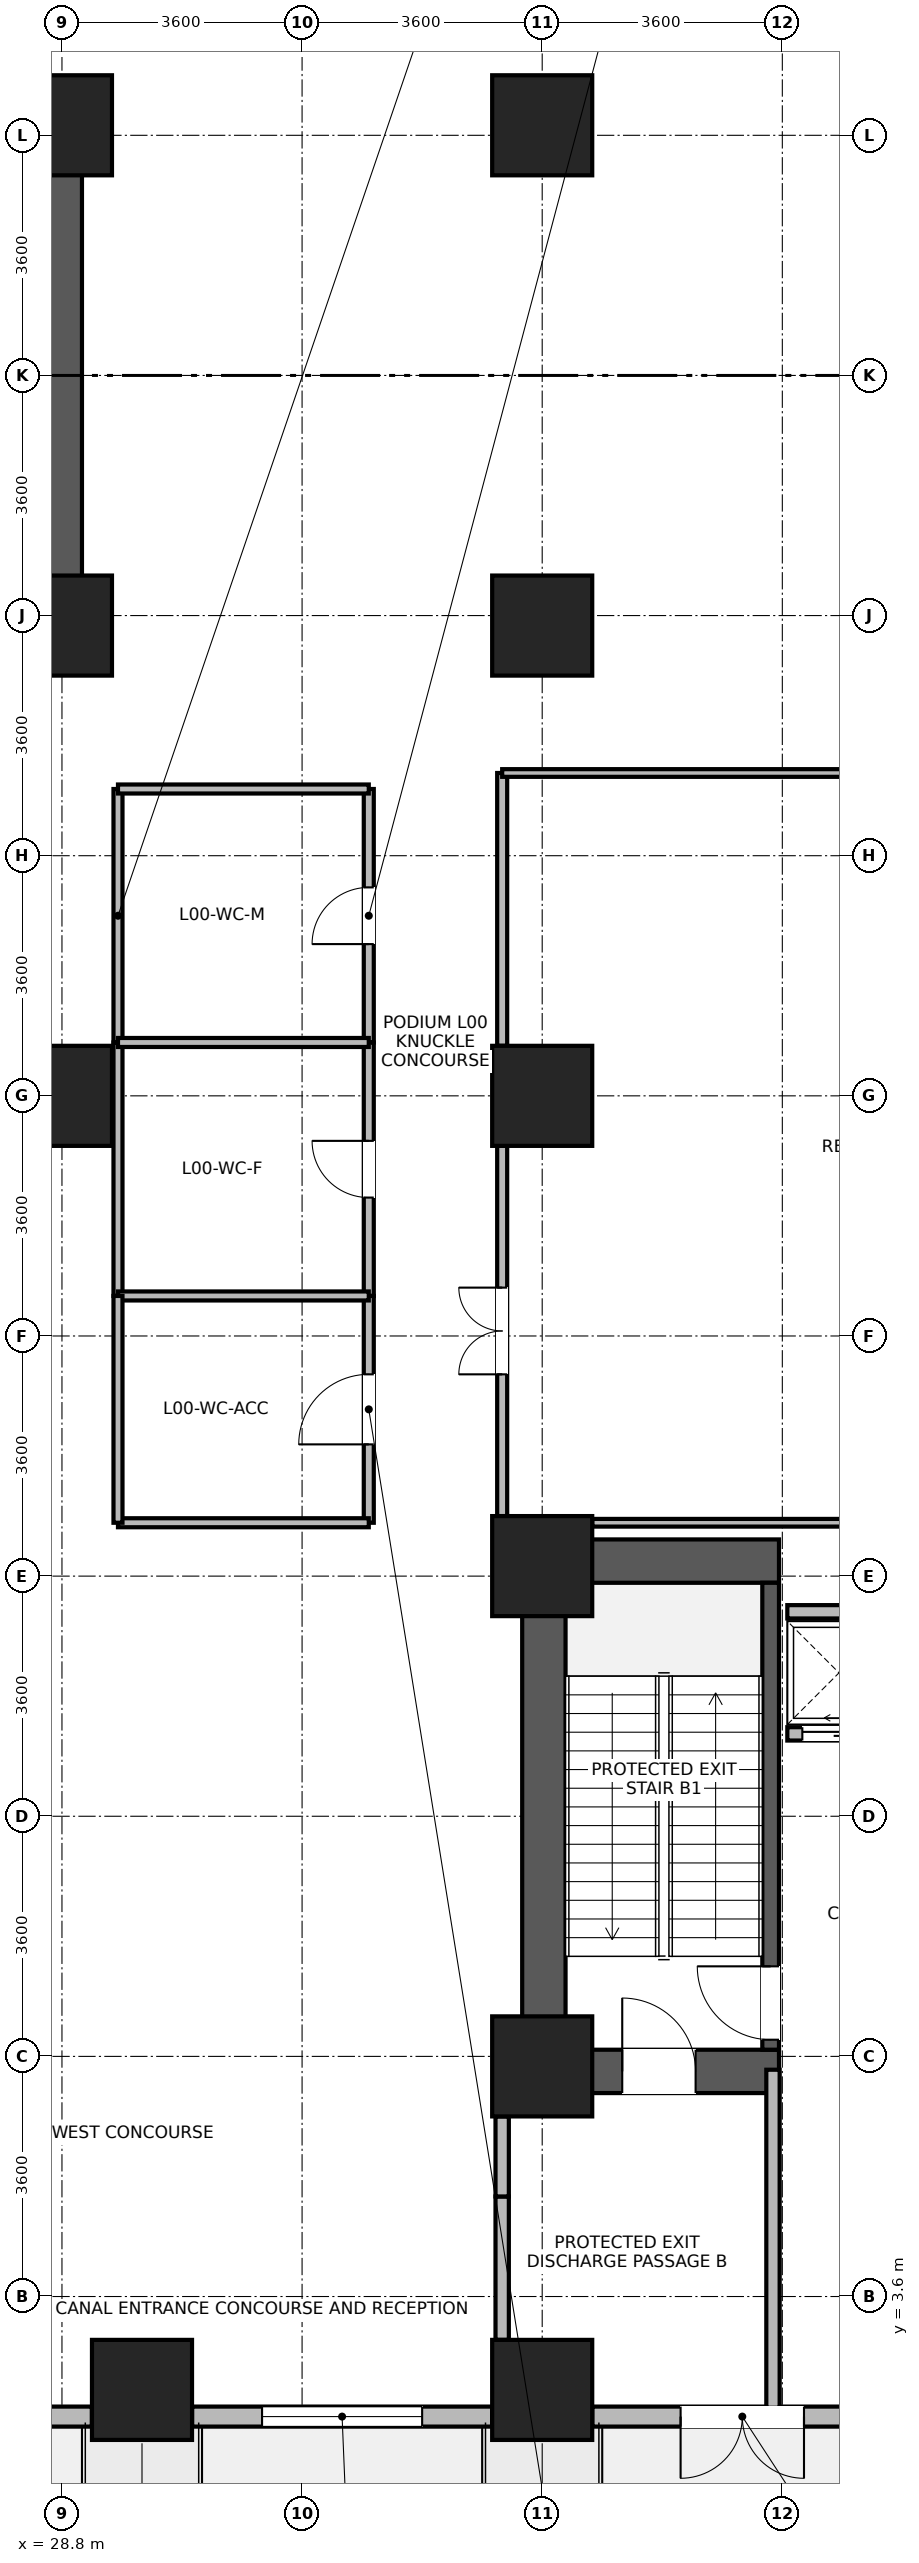
"""IFC4 building model, lengths in metres.
Left out: names, types, materials, properties, quantities, classifications, styles, units other than length and angle.
Written with IfcOpenShell. Run it as: python <this file> out.ifc"""

import sys

from ifc_helpers import new_model, si_unit, direction, frame, frame_2d, origin, origin_2d, place, context, subcontext, project, spatial, rectangle, extrude, source, transform, mapped, element, fill, save


model = new_model("IFC4")
c1 = context("Model", 3, precision=1e-05, world=origin(), true_north=direction((0.0, 1.0)))
c2 = subcontext(c1, "Body", "Model", "MODEL_VIEW")
j1 = project(units=[si_unit("LENGTHUNIT", "METRE"), si_unit("PLANEANGLEUNIT", "RADIAN")], contexts=[c1])
p1 = place(None, origin())
s1 = spatial("IfcSite", under=j1, at=p1, CompositionType="ELEMENT")
p2 = place(p1, origin())
s2 = spatial("IfcBuilding", under=s1, at=p2, CompositionType="ELEMENT")
p3 = place(p2, origin())
s3 = spatial("IfcBuildingStorey", under=s2, at=p3, CompositionType="ELEMENT", Elevation=0.0)
for number, where, z_axis, x_axis in (
    (1, (28.775, 28.2, 0.0), (0.0, 0.0, 1.0), (0.0, 1.0, 0.0)),
    (2, (36.025, 6.65, 0.0), (0.0, 0.0, 1.0), (0.0, 1.0, 0.0)),
):
    element("IfcWall", number, at=place(p3, frame(where, z_axis=z_axis, x_axis=x_axis)), inside=s3, PredefinedType="SHEAR", context=c2, shape_type="SweptSolid", body=[
        extrude(rectangle(XDim=8.3, YDim=0.65, at=frame_2d((4.15, 0.0))), origin(), (0.0, 0.0, 1.0), 5.12),
    ])
p4 = place(p3, frame((36.35, 6.975, 0.0), z_axis=(0.0, 0.0, 1.0), x_axis=(1.0, 0.0, 0.0)))
e3 = element("IfcWall", 3, at=p4, inside=s3, PredefinedType="SHEAR", context=c2, shape_type="SweptSolid", body=[
    extrude(rectangle(XDim=3.2, YDim=0.65, at=frame_2d((1.6, 0.0))), origin(), (0.0, 0.0, 1.0), 5.12),
])
p5 = place(p4, frame((0.85, 0.0, 0.0)))
e4 = element("IfcOpeningElement", 4, at=p5, cuts=e3, PredefinedType="OPENING", context=c2, shape_type="SweptSolid", body=[
    extrude(rectangle(XDim=1.1, YDim=2.08, at=frame_2d((0.55, 1.04))), frame((0.0, 0.335, 0.0), z_axis=(0.0, -1.0, 0.0), x_axis=(1.0, 0.0, 0.0)), (0.0, 0.0, 1.0), 0.67),
])
p6 = place(p3, frame((36.35, 14.625, 0.0), z_axis=(0.0, 0.0, 1.0), x_axis=(1.0, 0.0, 0.0)))
e5 = element("IfcWall", 5, at=p6, inside=s3, PredefinedType="SHEAR", context=c2, shape_type="SweptSolid", body=[
    extrude(rectangle(XDim=3.2, YDim=0.65, at=frame_2d((1.6, 0.0))), origin(), (0.0, 0.0, 1.0), 5.12),
])
p7 = place(p3, frame((39.425, 7.3, 0.0), z_axis=(0.0, 0.0, 1.0), x_axis=(0.0, 1.0, 0.0)))
e6 = element("IfcWall", 6, at=p7, inside=s3, PredefinedType="SHEAR", context=c2, shape_type="SweptSolid", body=[
    extrude(rectangle(XDim=7.0, YDim=0.25, at=frame_2d((3.5, 0.0))), origin(), (0.0, 0.0, 1.0), 5.12),
])
p8 = place(p7, frame((0.15, 0.0, 0.0)))
e7 = element("IfcOpeningElement", 7, at=p8, cuts=e6, PredefinedType="OPENING", context=c2, shape_type="SweptSolid", body=[
    extrude(rectangle(XDim=1.1, YDim=2.08, at=frame_2d((0.55, 1.04))), frame((0.0, 0.135, 0.0), z_axis=(0.0, -1.0, 0.0), x_axis=(1.0, 0.0, 0.0)), (0.0, 0.0, 1.0), 0.27),
])
m1 = source(origin(), c2, "Body", "SweptSolid", [
    extrude(rectangle(XDim=1.5, YDim=1.5, at=origin_2d()), origin(), (0.0, 0.0, 1.0), 5.4),
])
for number, where, z_axis, x_axis in (
    (8, (28.8, 21.6, 0.0), (0.0, 0.0, 1.0), (1.0, 0.0, 0.0)),
    (9, (28.8, 28.65, 0.0), (0.0, 0.0, 1.0), (1.0, 0.0, 0.0)),
    (10, (28.8, 36.15, 0.0), (0.0, 0.0, 1.0), (1.0, 0.0, 0.0)),
    (11, (36.0, 21.6, 0.0), (0.0, 0.0, 1.0), (1.0, 0.0, 0.0)),
    (12, (36.0, 28.65, 0.0), (0.0, 0.0, 1.0), (1.0, 0.0, 0.0)),
    (13, (36.0, 36.15, 0.0), (0.0, 0.0, 1.0), (1.0, 0.0, 0.0)),
    (14, (36.0, 7.05, 0.0), (0.0, 0.0, 1.0), (1.0, 0.0, 0.0)),
    (15, (36.0, 14.55, 0.0), (0.0, 0.0, 1.0), (1.0, 0.0, 0.0)),
    (16, (36.0, 2.2, 0.0), (0.0, 0.0, 1.0), (1.0, 0.0, 0.0)),
    (17, (30.0, 2.2, 0.0), (0.0, 0.0, 1.0), (1.0, 0.0, 0.0)),
):
    element("IfcColumn", number, at=place(p3, frame(where, z_axis=z_axis, x_axis=x_axis)), inside=s3, PredefinedType="COLUMN", context=c2, shape_type="MappedRepresentation", body=[
        mapped(m1, transform((0.0, 0.0, 0.0), x_axis=(1.0, 0.0, 0.0), y_axis=(0.0, 1.0, 0.0), z_axis=(0.0, 0.0, 1.0), scale=1.0)),
    ])
p9 = place(p3, frame((29.249, 1.8, 0.0), z_axis=(0.0, 0.0, 1.0), x_axis=(-1.0, 0.0, 0.0)))
e18 = element("IfcWall", 18, at=p9, inside=s3, PredefinedType="STANDARD", context=c2, shape_type="SweptSolid", body=[
    extrude(rectangle(XDim=4.498, YDim=0.3, at=frame_2d((2.249, 0.0))), origin(), (0.0, 0.0, 1.0), 5.1),
])
p10 = place(p9, frame((1.049, 0.0, 0.0)))
e19 = element("IfcOpeningElement", 19, at=p10, cuts=e18, PredefinedType="OPENING", context=c2, shape_type="SweptSolid", body=[
    extrude(rectangle(XDim=2.4, YDim=2.6, at=frame_2d((1.2, 1.3))), frame((0.0, 0.16, 0.0), z_axis=(0.0, -1.0, 0.0), x_axis=(1.0, 0.0, 0.0)), (0.0, 0.0, 1.0), 0.32),
])
p11 = place(p3, frame((35.249, 1.8, 0.0), z_axis=(0.0, 0.0, 1.0), x_axis=(-1.0, 0.0, 0.0)))
e20 = element("IfcWall", 20, at=p11, inside=s3, PredefinedType="STANDARD", context=c2, shape_type="SweptSolid", body=[
    extrude(rectangle(XDim=4.498, YDim=0.3, at=frame_2d((2.249, 0.0))), origin(), (0.0, 0.0, 1.0), 5.1),
])
p12 = place(p11, frame((1.049, 0.0, 0.9)))
e21 = element("IfcOpeningElement", 21, at=p12, cuts=e20, PredefinedType="OPENING", context=c2, shape_type="SweptSolid", body=[
    extrude(rectangle(XDim=2.4, YDim=2.5, at=frame_2d((1.2, 1.25))), frame((0.0, 0.16, 0.0), z_axis=(0.0, -1.0, 0.0), x_axis=(1.0, 0.0, 0.0)), (0.0, 0.0, 1.0), 0.32),
])
p13 = place(p3, frame((41.249, 1.8, 0.0), z_axis=(0.0, 0.0, 1.0), x_axis=(-1.0, 0.0, 0.0)))
e22 = element("IfcWall", 22, at=p13, inside=s3, PredefinedType="STANDARD", context=c2, shape_type="SweptSolid", body=[
    extrude(rectangle(XDim=4.498, YDim=0.3, at=frame_2d((2.249, 0.0))), origin(), (0.0, 0.0, 1.0), 5.1),
])
p14 = place(p13, frame((1.324, 0.0, 0.0)))
e23 = element("IfcOpeningElement", 23, at=p14, cuts=e22, PredefinedType="OPENING", context=c2, shape_type="SweptSolid", body=[
    extrude(rectangle(XDim=1.85, YDim=2.25, at=frame_2d((0.925, 1.125))), frame((0.0, 0.16, 0.0), z_axis=(0.0, -1.0, 0.0), x_axis=(1.0, 0.0, 0.0)), (0.0, 0.0, 1.0), 0.32),
])
p15 = place(p3, frame((39.675, 12.035, 0.0), z_axis=(0.0, 0.0, 1.0), x_axis=(1.0, 0.0, 0.0)))
e24 = element("IfcWall", 24, at=p15, inside=s3, PredefinedType="PARTITIONING", context=c2, shape_type="SweptSolid", body=[
    extrude(rectangle(XDim=1.55, YDim=0.2, at=frame_2d((0.775, 0.0))), origin(), (0.0, 0.0, 1.0), 5.1),
])
p16 = place(p15, frame((0.225, 0.0, 0.0)))
e25 = element("IfcOpeningElement", 25, at=p16, cuts=e24, PredefinedType="OPENING", context=c2, shape_type="SweptSolid", body=[
    extrude(rectangle(XDim=1.1, YDim=2.12, at=frame_2d((0.55, 1.06))), frame((0.0, 0.11, 0.0), z_axis=(0.0, -1.0, 0.0), x_axis=(1.0, 0.0, 0.0)), (0.0, 0.0, 1.0), 0.22),
])
p17 = place(p3, frame((39.675, 13.865, 0.0), z_axis=(0.0, 0.0, 1.0), x_axis=(1.0, 0.0, 0.0)))
e26 = element("IfcWall", 26, at=p17, inside=s3, PredefinedType="PARTITIONING", context=c2, shape_type="SweptSolid", body=[
    extrude(rectangle(XDim=1.55, YDim=0.2, at=frame_2d((0.775, 0.0))), origin(), (0.0, 0.0, 1.0), 5.1),
])
p18 = place(p3, frame((39.46, 1.932, 0.0), z_axis=(0.0, 0.0, 1.0), x_axis=(0.0, 1.0, 0.0)))
e27 = element("IfcWall", 27, at=p18, inside=s3, PredefinedType="PARTITIONING", context=c2, shape_type="SweptSolid", body=[
    extrude(rectangle(XDim=5.068, YDim=0.2, at=frame_2d((2.534, 0.0))), origin(), (0.0, 0.0, 1.0), 5.1),
])
p19 = place(p3, frame((35.4, 2.95, 0.0), z_axis=(0.0, 0.0, 1.0), x_axis=(0.0, 1.0, 0.0)))
e28 = element("IfcWall", 28, at=p19, inside=s3, PredefinedType="PARTITIONING", context=c2, shape_type="SweptSolid", body=[
    extrude(rectangle(XDim=2.15, YDim=0.2, at=frame_2d((1.075, 0.0))), origin(), (0.0, 0.0, 1.0), 5.1),
])
p20 = place(p3, frame((35.4, 5.1, 0.0), z_axis=(0.0, 0.0, 1.0), x_axis=(0.0, 1.0, 0.0)))
e29 = element("IfcWall", 29, at=p20, inside=s3, PredefinedType="PARTITIONING", context=c2, shape_type="SweptSolid", body=[
    extrude(rectangle(XDim=1.2, YDim=0.2, at=frame_2d((0.6, 0.0))), origin(), (0.0, 0.0, 1.0), 5.1),
])
p21 = place(p3, frame((35.4, 15.3, 0.0), z_axis=(0.0, 0.0, 1.0), x_axis=(0.0, 1.0, 0.0)))
e30 = element("IfcWall", 30, at=p21, inside=s3, PredefinedType="PARTITIONING", context=c2, shape_type="SweptSolid", body=[
    extrude(rectangle(XDim=5.55, YDim=0.15, at=frame_2d((2.775, 0.0))), origin(), (0.0, 0.0, 1.0), 5.1),
])
p22 = place(p21, frame((2.125, 0.0, 0.0)))
e31 = element("IfcOpeningElement", 31, at=p22, cuts=e30, PredefinedType="OPENING", context=c2, shape_type="SweptSolid", body=[
    extrude(rectangle(XDim=1.3, YDim=2.12, at=frame_2d((0.65, 1.06))), frame((0.0, 0.085, 0.0), z_axis=(0.0, -1.0, 0.0), x_axis=(1.0, 0.0, 0.0)), (0.0, 0.0, 1.0), 0.17),
])
p23 = place(p3, frame((35.4, 22.35, 0.0), z_axis=(0.0, 0.0, 1.0), x_axis=(0.0, 1.0, 0.0)))
e32 = element("IfcWall", 32, at=p23, inside=s3, PredefinedType="PARTITIONING", context=c2, shape_type="SweptSolid", body=[
    extrude(rectangle(XDim=4.09, YDim=0.15, at=frame_2d((2.045, 0.0))), origin(), (0.0, 0.0, 1.0), 5.1),
])
p24 = place(p3, frame((33.4, 22.4, 0.0), z_axis=(0.0, 0.0, 1.0), x_axis=(0.0, 1.0, 0.0)))
e33 = element("IfcWall", 33, at=p24, inside=s3, PredefinedType="PARTITIONING", context=c2, shape_type="SweptSolid", body=[
    extrude(rectangle(XDim=3.8, YDim=0.15, at=frame_2d((1.9, 0.0))), origin(), (0.0, 0.0, 1.0), 5.1),
])
p25 = place(p24, frame((1.475, 0.0, 0.0)))
e34 = element("IfcOpeningElement", 34, at=p25, cuts=e33, PredefinedType="OPENING", context=c2, shape_type="SweptSolid", body=[
    extrude(rectangle(XDim=0.85, YDim=2.04, at=frame_2d((0.425, 1.02))), frame((0.0, 0.085, 0.0), z_axis=(0.0, -1.0, 0.0), x_axis=(1.0, 0.0, 0.0)), (0.0, 0.0, 1.0), 0.17),
])
p26 = place(p3, frame((33.4, 18.6, 0.0), z_axis=(0.0, 0.0, 1.0), x_axis=(0.0, 1.0, 0.0)))
e35 = element("IfcWall", 35, at=p26, inside=s3, PredefinedType="PARTITIONING", context=c2, shape_type="SweptSolid", body=[
    extrude(rectangle(XDim=3.8, YDim=0.15, at=frame_2d((1.9, 0.0))), origin(), (0.0, 0.0, 1.0), 5.1),
])
p27 = place(p26, frame((1.475, 0.0, 0.0)))
e36 = element("IfcOpeningElement", 36, at=p27, cuts=e35, PredefinedType="OPENING", context=c2, shape_type="SweptSolid", body=[
    extrude(rectangle(XDim=0.85, YDim=2.04, at=frame_2d((0.425, 1.02))), frame((0.0, 0.085, 0.0), z_axis=(0.0, -1.0, 0.0), x_axis=(1.0, 0.0, 0.0)), (0.0, 0.0, 1.0), 0.17),
])
p28 = place(p3, frame((33.4, 15.2, 0.0), z_axis=(0.0, 0.0, 1.0), x_axis=(0.0, 1.0, 0.0)))
e37 = element("IfcWall", 37, at=p28, inside=s3, PredefinedType="PARTITIONING", context=c2, shape_type="SweptSolid", body=[
    extrude(rectangle(XDim=3.4, YDim=0.15, at=frame_2d((1.7, 0.0))), origin(), (0.0, 0.0, 1.0), 5.1),
])
p29 = place(p28, frame((1.175, 0.0, 0.0)))
e38 = element("IfcOpeningElement", 38, at=p29, cuts=e37, PredefinedType="OPENING", context=c2, shape_type="SweptSolid", body=[
    extrude(rectangle(XDim=1.05, YDim=2.12, at=frame_2d((0.525, 1.06))), frame((0.0, 0.085, 0.0), z_axis=(0.0, -1.0, 0.0), x_axis=(1.0, 0.0, 0.0)), (0.0, 0.0, 1.0), 0.17),
])
p30 = place(p3, frame((36.75, 15.2, 0.0), z_axis=(0.0, 0.0, 1.0), x_axis=(1.0, 0.0, 0.0)))
e39 = element("IfcWall", 39, at=p30, inside=s3, PredefinedType="PARTITIONING", context=c2, shape_type="SweptSolid", body=[
    extrude(rectangle(XDim=5.7, YDim=0.115, at=frame_2d((2.85, 0.0))), origin(), (0.0, 0.0, 1.0), 5.1),
])
p31 = place(p3, frame((35.4, 26.44, 0.0), z_axis=(0.0, 0.0, 1.0), x_axis=(1.0, 0.0, 0.0)))
e40 = element("IfcWall", 40, at=p31, inside=s3, PredefinedType="PARTITIONING", context=c2, shape_type="SweptSolid", body=[
    extrude(rectangle(XDim=15.0, YDim=0.115, at=frame_2d((7.5, 0.0))), origin(), (0.0, 0.0, 1.0), 5.1),
])
p32 = place(p3, frame((29.64, 22.4, 0.0), z_axis=(0.0, 0.0, 1.0), x_axis=(0.0, 1.0, 0.0)))
e41 = element("IfcWall", 41, at=p32, inside=s3, PredefinedType="PARTITIONING", context=c2, shape_type="SweptSolid", body=[
    extrude(rectangle(XDim=3.8, YDim=0.135, at=frame_2d((1.9, 0.0))), origin(), (0.0, 0.0, 1.0), 5.1),
])
p33 = place(p3, frame((29.64, 18.6, 0.0), z_axis=(0.0, 0.0, 1.0), x_axis=(0.0, 1.0, 0.0)))
e42 = element("IfcWall", 42, at=p33, inside=s3, PredefinedType="PARTITIONING", context=c2, shape_type="SweptSolid", body=[
    extrude(rectangle(XDim=3.8, YDim=0.135, at=frame_2d((1.9, 0.0))), origin(), (0.0, 0.0, 1.0), 5.1),
])
for number, where, z_axis, x_axis in (
    (43, (29.64, 15.2, 0.0), (0.0, 0.0, 1.0), (1.0, 0.0, 0.0)),
    (44, (29.64, 18.6, 0.0), (0.0, 0.0, 1.0), (1.0, 0.0, 0.0)),
    (45, (29.64, 22.4, 0.0), (0.0, 0.0, 1.0), (1.0, 0.0, 0.0)),
    (46, (29.64, 26.2, 0.0), (0.0, 0.0, 1.0), (1.0, 0.0, 0.0)),
):
    element("IfcWall", number, at=place(p3, frame(where, z_axis=z_axis, x_axis=x_axis)), inside=s3, PredefinedType="PARTITIONING", context=c2, shape_type="SweptSolid", body=[
        extrude(rectangle(XDim=3.76, YDim=0.135, at=frame_2d((1.88, 0.0))), origin(), (0.0, 0.0, 1.0), 5.1),
    ])
p34 = place(p3, frame((29.64, 15.2, 0.0), z_axis=(0.0, 0.0, 1.0), x_axis=(0.0, 1.0, 0.0)))
e47 = element("IfcWall", 47, at=p34, inside=s3, PredefinedType="PARTITIONING", context=c2, shape_type="SweptSolid", body=[
    extrude(rectangle(XDim=3.4, YDim=0.135, at=frame_2d((1.7, 0.0))), origin(), (0.0, 0.0, 1.0), 5.1),
])
p35 = place(p12, origin())
e48 = element("IfcWindow", 48, at=p35, inside=s3, PartitioningType="SINGLE_PANEL", PredefinedType="WINDOW", context=c2, shape_type="SweptSolid", body=[
    extrude(rectangle(XDim=2.4, YDim=2.5, at=frame_2d((1.2, 1.25))), frame((0.0, 0.03, 0.0), z_axis=(0.0, -1.0, 0.0), x_axis=(1.0, 0.0, 0.0)), (0.0, 0.0, 1.0), 0.06),
])
fill(e21, e48)
p36 = place(p14, origin())
e49 = element("IfcDoor", 49, at=p36, inside=s3, OperationType="DOUBLE_DOOR_SINGLE_SWING", PredefinedType="DOOR", context=c2, shape_type="SweptSolid", body=[
    extrude(rectangle(XDim=1.85, YDim=2.25, at=frame_2d((0.925, 1.125))), frame((0.0, 0.025, 0.0), z_axis=(0.0, -1.0, 0.0), x_axis=(1.0, 0.0, 0.0)), (0.0, 0.0, 1.0), 0.05),
])
fill(e23, e49)
p37 = place(p8, origin())
e50 = element("IfcDoor", 50, at=p37, inside=s3, OperationType="SINGLE_SWING_RIGHT", PredefinedType="DOOR", context=c2, shape_type="SweptSolid", body=[
    extrude(rectangle(XDim=1.1, YDim=2.08, at=frame_2d((0.55, 1.04))), frame((0.0, 0.025, 0.0), z_axis=(0.0, -1.0, 0.0), x_axis=(1.0, 0.0, 0.0)), (0.0, 0.0, 1.0), 0.05),
])
fill(e7, e50)
p38 = place(p5, origin())
e51 = element("IfcDoor", 51, at=p38, inside=s3, OperationType="SINGLE_SWING_LEFT", PredefinedType="DOOR", context=c2, shape_type="SweptSolid", body=[
    extrude(rectangle(XDim=1.1, YDim=2.08, at=frame_2d((0.55, 1.04))), frame((0.0, 0.025, 0.0), z_axis=(0.0, -1.0, 0.0), x_axis=(1.0, 0.0, 0.0)), (0.0, 0.0, 1.0), 0.05),
])
fill(e4, e51)
p39 = place(p16, origin())
e52 = element("IfcDoor", 52, at=p39, inside=s3, OperationType="SLIDING_TO_LEFT", PredefinedType="DOOR", context=c2, shape_type="SweptSolid", body=[
    extrude(rectangle(XDim=1.1, YDim=2.12, at=frame_2d((0.55, 1.06))), frame((0.0, 0.025, 0.0), z_axis=(0.0, -1.0, 0.0), x_axis=(1.0, 0.0, 0.0)), (0.0, 0.0, 1.0), 0.05),
])
fill(e25, e52)
p40 = place(p22, origin())
e53 = element("IfcDoor", 53, at=p40, inside=s3, OperationType="DOUBLE_DOOR_SINGLE_SWING", PredefinedType="DOOR", context=c2, shape_type="SweptSolid", body=[
    extrude(rectangle(XDim=1.3, YDim=2.12, at=frame_2d((0.65, 1.06))), frame((0.0, 0.025, 0.0), z_axis=(0.0, -1.0, 0.0), x_axis=(1.0, 0.0, 0.0)), (0.0, 0.0, 1.0), 0.05),
])
fill(e31, e53)
p41 = place(p25, origin())
e54 = element("IfcDoor", 54, at=p41, inside=s3, OperationType="SINGLE_SWING_LEFT", PredefinedType="DOOR", context=c2, shape_type="SweptSolid", body=[
    extrude(rectangle(XDim=0.85, YDim=2.04, at=frame_2d((0.425, 1.02))), frame((0.0, 0.025, 0.0), z_axis=(0.0, -1.0, 0.0), x_axis=(1.0, 0.0, 0.0)), (0.0, 0.0, 1.0), 0.05),
])
fill(e34, e54)
p42 = place(p27, origin())
e55 = element("IfcDoor", 55, at=p42, inside=s3, OperationType="SINGLE_SWING_RIGHT", PredefinedType="DOOR", context=c2, shape_type="SweptSolid", body=[
    extrude(rectangle(XDim=0.85, YDim=2.04, at=frame_2d((0.425, 1.02))), frame((0.0, 0.025, 0.0), z_axis=(0.0, -1.0, 0.0), x_axis=(1.0, 0.0, 0.0)), (0.0, 0.0, 1.0), 0.05),
])
fill(e36, e55)
p43 = place(p29, origin())
e56 = element("IfcDoor", 56, at=p43, inside=s3, OperationType="SINGLE_SWING_LEFT", PredefinedType="DOOR", context=c2, shape_type="SweptSolid", body=[
    extrude(rectangle(XDim=1.05, YDim=2.12, at=frame_2d((0.525, 1.06))), frame((0.0, 0.025, 0.0), z_axis=(0.0, -1.0, 0.0), x_axis=(1.0, 0.0, 0.0)), (0.0, 0.0, 1.0), 0.05),
])
fill(e38, e56)
save(model, sys.argv[1])
